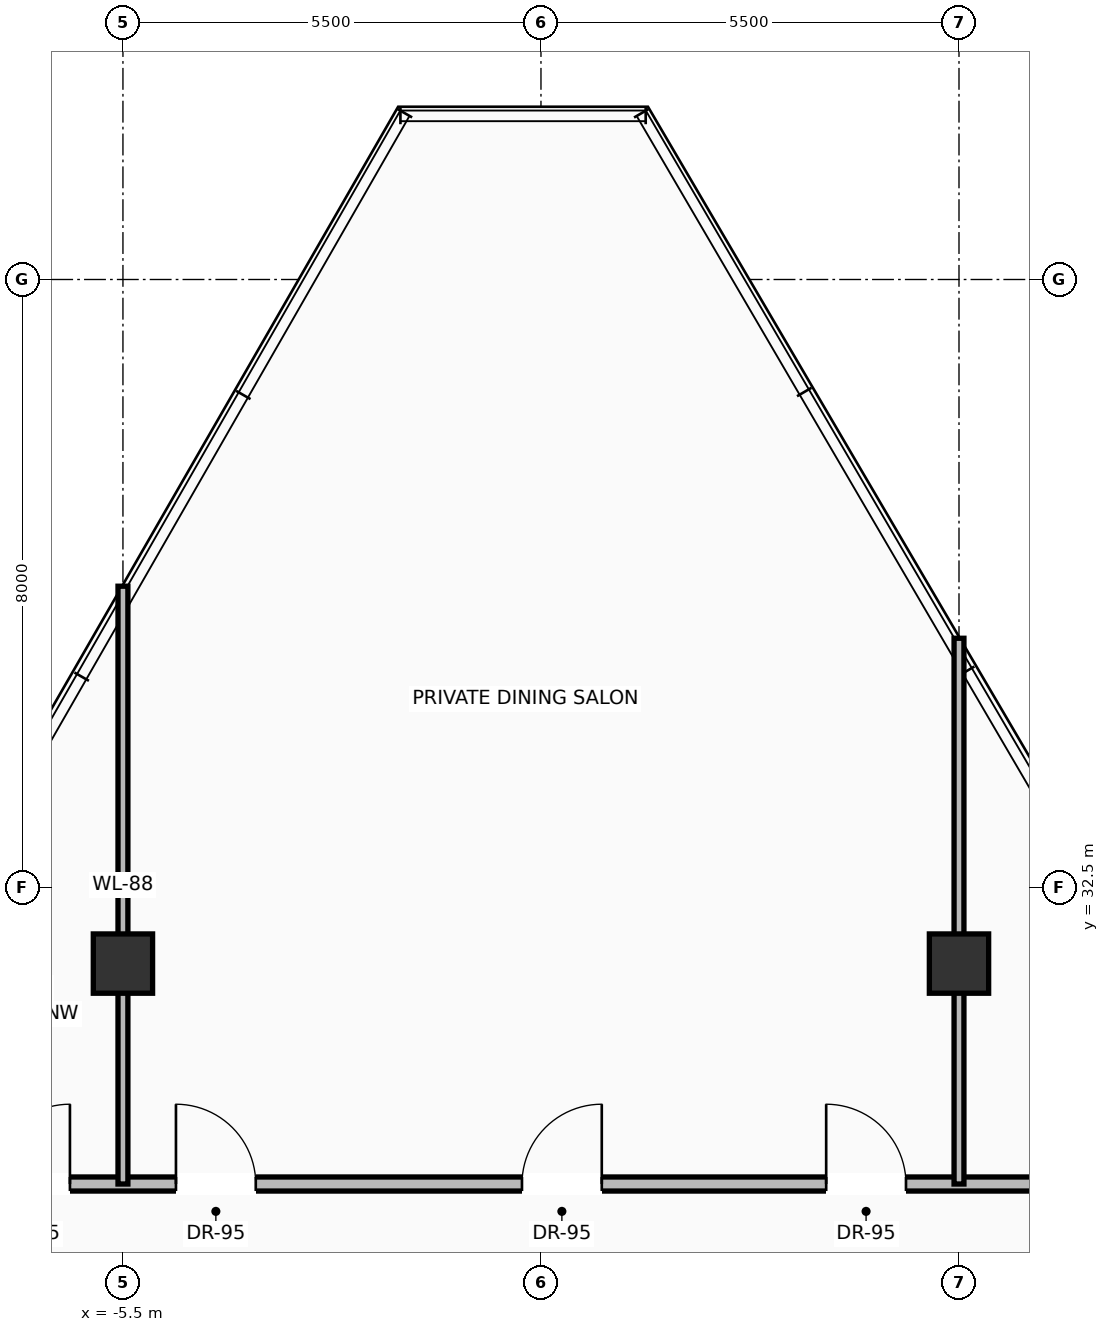
"""IFC4 building model, lengths in metres.
Left out: names, types, materials, properties, quantities, classifications, styles, units other than length and angle.
Written with IfcOpenShell. Run it as: python <this file> out.ifc"""

import sys

from ifc_helpers import new_model, si_unit, direction, frame, frame_2d, origin, origin_2d, place, context, subcontext, project, spatial, rectangle, extrude, source, transform, mapped, element, fill, save


model = new_model("IFC4")
c1 = context("Model", 3, precision=1e-05, world=origin(), true_north=direction((0.0, 1.0)))
c2 = subcontext(c1, "Body", "Model", "MODEL_VIEW")
j1 = project(units=[si_unit("LENGTHUNIT", "METRE"), si_unit("PLANEANGLEUNIT", "RADIAN")], contexts=[c1])
p1 = place(None, origin())
s1 = spatial("IfcSite", under=j1, at=p1, CompositionType="ELEMENT")
p2 = place(p1, origin())
s2 = spatial("IfcBuilding", under=s1, at=p2, CompositionType="ELEMENT")
p3 = place(p2, frame((0.0, 0.0, 283.35)))
s3 = spatial("IfcBuildingStorey", under=s2, at=p3, CompositionType="ELEMENT", Elevation=283.35)
m1 = source(origin(), c2, "Body", "SweptSolid", [
    extrude(rectangle(XDim=0.78, YDim=0.78, at=origin_2d()), origin(), (0.0, 0.0, 1.0), 3.45),
])
for number, where, z_axis, x_axis in (
    (1, (-5.5, 31.5, 0.0), (0.0, 0.0, 1.0), (1.0, 0.0, 0.0)),
    (2, (5.5, 31.5, 0.0), (0.0, 0.0, 1.0), (1.0, 0.0, 0.0)),
):
    element("IfcColumn", number, at=place(p3, frame(where, z_axis=z_axis, x_axis=x_axis)), inside=s3, PredefinedType="COLUMN", context=c2, shape_type="MappedRepresentation", body=[
        mapped(m1, transform((0.0, 0.0, 0.0), scale=1.0)),
    ])
p4 = place(p3, frame((-8.05, 28.6, 0.0), z_axis=(0.0, 0.0, 1.0), x_axis=(1.0, 0.0, 0.0)))
e3 = element("IfcWall", 3, at=p4, inside=s3, PredefinedType="PARTITIONING", context=c2, shape_type="SweptSolid", body=[
    extrude(rectangle(XDim=16.65, YDim=0.185, at=frame_2d((8.325, 0.0))), origin(), (0.0, 0.0, 1.0), 3.232),
])
p5 = place(p4, frame((3.248, 0.0, 0.0)))
e4 = element("IfcOpeningElement", 4, at=p5, cuts=e3, PredefinedType="OPENING", context=c2, shape_type="SweptSolid", body=[
    extrude(rectangle(XDim=1.05, YDim=2.25, at=frame_2d((0.525, 1.125))), frame((0.0, 0.103, 0.0), z_axis=(0.0, -1.0, 0.0), x_axis=(1.0, 0.0, 0.0)), (0.0, 0.0, 1.0), 0.205),
])
p6 = place(p4, frame((7.8, 0.0, 0.0)))
e5 = element("IfcOpeningElement", 5, at=p6, cuts=e3, PredefinedType="OPENING", context=c2, shape_type="SweptSolid", body=[
    extrude(rectangle(XDim=1.05, YDim=2.25, at=frame_2d((0.525, 1.125))), frame((0.0, 0.103, 0.0), z_axis=(0.0, -1.0, 0.0), x_axis=(1.0, 0.0, 0.0)), (0.0, 0.0, 1.0), 0.205),
])
p7 = place(p4, frame((11.802, 0.0, 0.0)))
e6 = element("IfcOpeningElement", 6, at=p7, cuts=e3, PredefinedType="OPENING", context=c2, shape_type="SweptSolid", body=[
    extrude(rectangle(XDim=1.05, YDim=2.25, at=frame_2d((0.525, 1.125))), frame((0.0, 0.103, 0.0), z_axis=(0.0, -1.0, 0.0), x_axis=(1.0, 0.0, 0.0)), (0.0, 0.0, 1.0), 0.205),
])
p8 = place(p4, frame((0.802, 0.0, 0.0)))
e7 = element("IfcOpeningElement", 7, at=p8, cuts=e3, PredefinedType="OPENING", context=c2, shape_type="SweptSolid", body=[
    extrude(rectangle(XDim=1.05, YDim=2.25, at=frame_2d((0.525, 1.125))), frame((0.0, 0.103, 0.0), z_axis=(0.0, -1.0, 0.0), x_axis=(1.0, 0.0, 0.0)), (0.0, 0.0, 1.0), 0.205),
])
p9 = place(p3, frame((-5.5, 28.6, 0.0), z_axis=(0.0, 0.0, 1.0), x_axis=(0.0, 1.0, 0.0)))
e8 = element("IfcWall", 8, at=p9, inside=s3, PredefinedType="PARTITIONING", context=c2, shape_type="SweptSolid", body=[
    extrude(rectangle(XDim=7.865, YDim=0.13, at=frame_2d((3.932, 0.0))), origin(), (0.0, 0.0, 1.0), 2.683),
])
p10 = place(p3, frame((5.5, 28.6, 0.0), z_axis=(0.0, 0.0, 1.0), x_axis=(0.0, 1.0, 0.0)))
e9 = element("IfcWall", 9, at=p10, inside=s3, PredefinedType="PARTITIONING", context=c2, shape_type="SweptSolid", body=[
    extrude(rectangle(XDim=7.18, YDim=0.13, at=frame_2d((3.59, 0.0))), origin(), (0.0, 0.0, 1.0), 2.683),
])
m2 = source(origin(), c2, "Body", "SweptSolid", [
    extrude(rectangle(XDim=1.05, YDim=2.25, at=frame_2d((0.525, 1.125))), frame((0.0, 0.025, 0.0), z_axis=(0.0, -1.0, 0.0), x_axis=(1.0, 0.0, 0.0)), (0.0, 0.0, 1.0), 0.05),
])
p11 = place(p5, origin())
e10 = element("IfcDoor", 10, at=p11, inside=s3, OperationType="SINGLE_SWING_LEFT", PredefinedType="DOOR", context=c2, shape_type="MappedRepresentation", body=[
    mapped(m2, transform((0.0, 0.0, 0.0), scale=1.0)),
])
fill(e4, e10)
p12 = place(p6, origin())
e11 = element("IfcDoor", 11, at=p12, inside=s3, OperationType="SINGLE_SWING_RIGHT", PredefinedType="DOOR", context=c2, shape_type="MappedRepresentation", body=[
    mapped(m2, transform((0.0, 0.0, 0.0), scale=1.0)),
])
fill(e5, e11)
p13 = place(p7, origin())
e12 = element("IfcDoor", 12, at=p13, inside=s3, OperationType="SINGLE_SWING_LEFT", PredefinedType="DOOR", context=c2, shape_type="MappedRepresentation", body=[
    mapped(m2, transform((0.0, 0.0, 0.0), scale=1.0)),
])
fill(e6, e12)
p14 = place(p8, origin())
e13 = element("IfcDoor", 13, at=p14, inside=s3, OperationType="SINGLE_SWING_RIGHT", PredefinedType="DOOR", context=c2, shape_type="MappedRepresentation", body=[
    mapped(m2, transform((0.0, 0.0, 0.0), scale=1.0)),
])
fill(e7, e13)
save(model, sys.argv[1])
